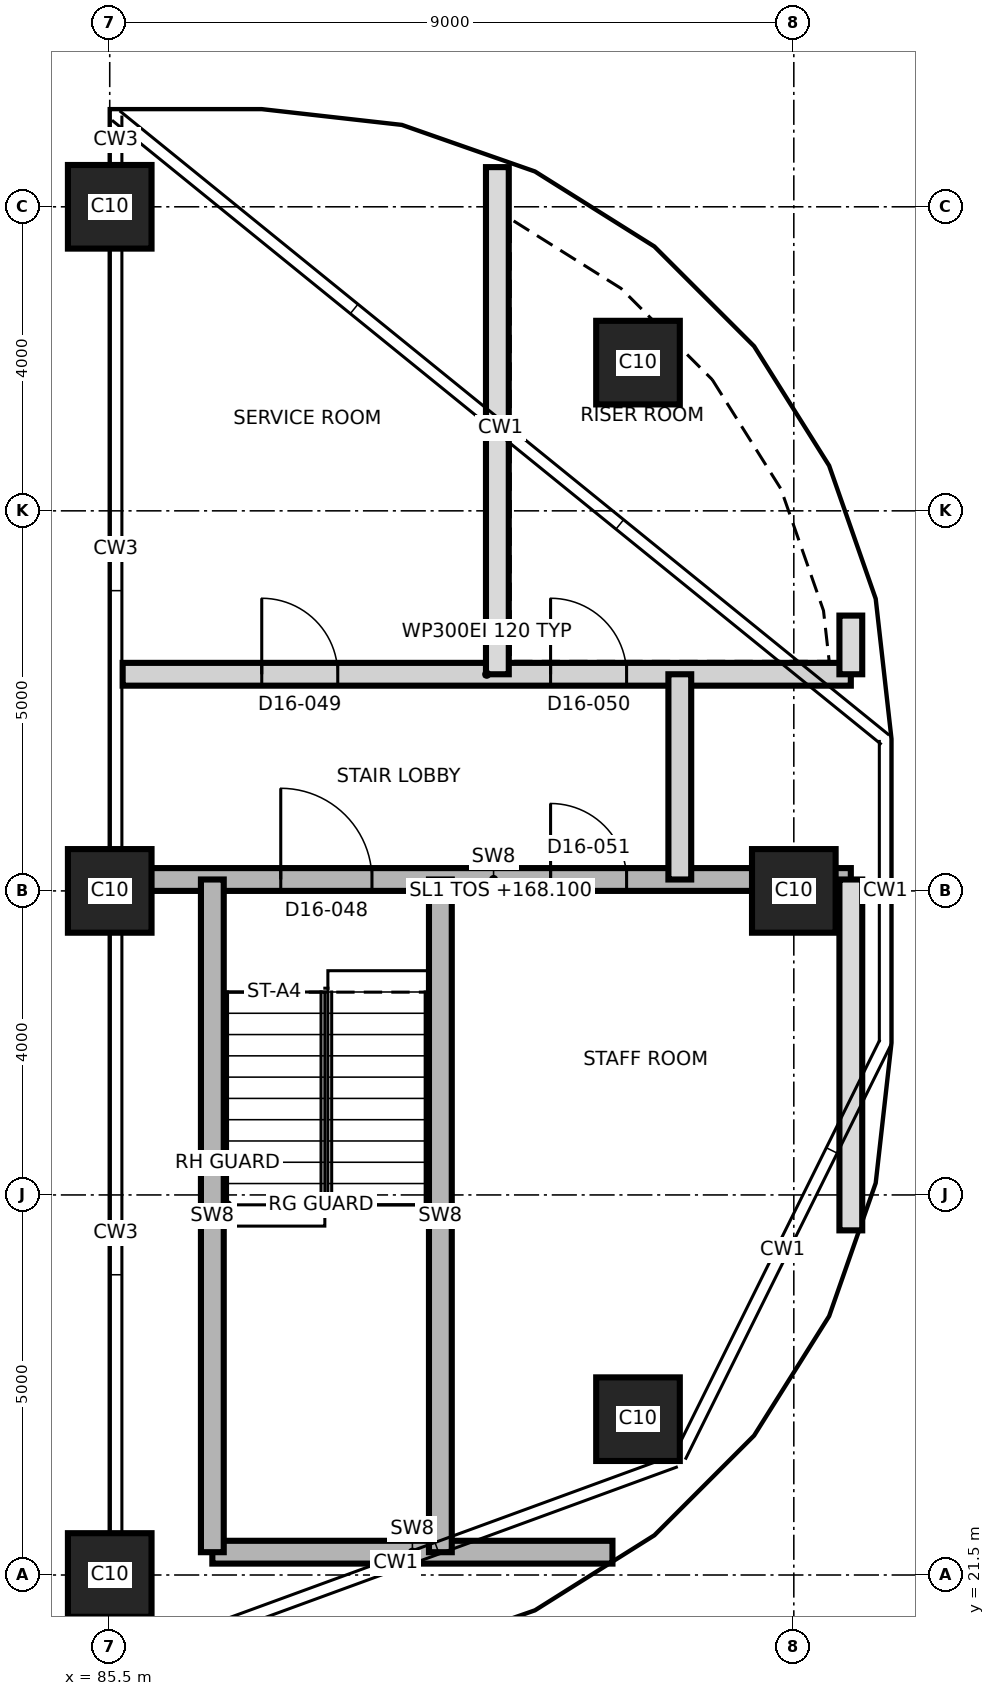
"""IFC4 building model, lengths in metres.
Left out: names, types, materials, properties, quantities, classifications, styles, units other than length and angle.
Written with IfcOpenShell. Run it as: python <this file> out.ifc"""

import sys

from ifc_helpers import new_model, si_unit, direction, frame, frame_2d, origin, origin_2d, place, context, subcontext, project, spatial, rectangle, extrude, element, fill, save


model = new_model("IFC4")
c1 = context("Model", 3, precision=1e-05, world=origin(), true_north=direction((0.0, 1.0)))
c2 = subcontext(c1, "Body", "Model", "MODEL_VIEW")
j1 = project(units=[si_unit("LENGTHUNIT", "METRE"), si_unit("PLANEANGLEUNIT", "RADIAN")], contexts=[c1])
p1 = place(None, origin())
s1 = spatial("IfcSite", under=j1, at=p1, CompositionType="ELEMENT")
p2 = place(p1, origin())
s2 = spatial("IfcBuilding", under=s1, at=p2, CompositionType="ELEMENT")
p3 = place(p2, frame((0.0, 0.0, 168.1)))
s3 = spatial("IfcBuildingStorey", under=s2, at=p3, CompositionType="ELEMENT", Elevation=168.1)
for number, where, z_axis, x_axis in (
    (1, (85.5, 21.5, 0.0), (0.0, 0.0, 1.0), (1.0, 0.0, 0.0)),
    (2, (92.45, 23.55, 0.0), (0.0, 0.0, 1.0), (1.0, 0.0, 0.0)),
    (3, (85.5, 30.5, 0.0), (0.0, 0.0, 1.0), (1.0, 0.0, 0.0)),
    (4, (94.5, 30.5, 0.0), (0.0, 0.0, 1.0), (1.0, 0.0, 0.0)),
    (5, (92.45, 37.45, 0.0), (0.0, 0.0, 1.0), (1.0, 0.0, 0.0)),
    (6, (85.5, 39.5, 0.0), (0.0, 0.0, 1.0), (1.0, 0.0, 0.0)),
):
    element("IfcColumn", number, at=place(p3, frame(where, z_axis=z_axis, x_axis=x_axis)), inside=s3, PredefinedType="COLUMN", context=c2, shape_type="SweptSolid", body=[
        extrude(rectangle(XDim=1.1, YDim=1.1, at=origin_2d()), origin(), (0.0, 0.0, 1.0), 3.7),
    ])
p4 = place(p3, frame((86.85, 21.8, 0.0), z_axis=(0.0, 0.0, 1.0), x_axis=(1.0, 0.0, 0.0)))
e7 = element("IfcWall", 7, at=p4, inside=s3, PredefinedType="SHEAR", context=c2, shape_type="SweptSolid", body=[
    extrude(rectangle(XDim=5.264, YDim=0.3, at=frame_2d((2.632, 0.0))), origin(), (0.0, 0.0, 1.0), 3.4),
])
p5 = place(p3, frame((85.85, 30.65, 0.0), z_axis=(0.0, 0.0, 1.0), x_axis=(1.0, 0.0, 0.0)))
e8 = element("IfcWall", 8, at=p5, inside=s3, PredefinedType="SHEAR", context=c2, shape_type="SweptSolid", body=[
    extrude(rectangle(XDim=9.4, YDim=0.3, at=frame_2d((4.7, 0.0))), origin(), (0.0, 0.0, 1.0), 3.4),
])
p6 = place(p5, frame((1.9, 0.0, 0.0)))
e9 = element("IfcOpeningElement", 9, at=p6, cuts=e8, PredefinedType="OPENING", context=c2, shape_type="SweptSolid", body=[
    extrude(rectangle(XDim=1.2, YDim=2.1, at=frame_2d((0.6, 1.05))), frame((0.0, 0.16, 0.0), z_axis=(0.0, -1.0, 0.0), x_axis=(1.0, 0.0, 0.0)), (0.0, 0.0, 1.0), 0.32),
])
p7 = place(p5, frame((5.45, 0.0, 0.0)))
e10 = element("IfcOpeningElement", 10, at=p7, cuts=e8, PredefinedType="OPENING", context=c2, shape_type="SweptSolid", body=[
    extrude(rectangle(XDim=1.0, YDim=2.1, at=frame_2d((0.5, 1.05))), frame((0.0, 0.16, 0.0), z_axis=(0.0, -1.0, 0.0), x_axis=(1.0, 0.0, 0.0)), (0.0, 0.0, 1.0), 0.32),
])
p8 = place(p3, frame((85.67, 33.35, 0.0), z_axis=(0.0, 0.0, 1.0), x_axis=(1.0, 0.0, 0.0)))
e11 = element("IfcWall", 11, at=p8, inside=s3, PredefinedType="PARTITIONING", context=c2, shape_type="SweptSolid", body=[
    extrude(rectangle(XDim=9.58, YDim=0.3, at=frame_2d((4.79, 0.0))), origin(), (0.0, 0.0, 1.0), 3.4),
])
p9 = place(p8, frame((1.83, 0.0, 0.0)))
e12 = element("IfcOpeningElement", 12, at=p9, cuts=e11, PredefinedType="OPENING", context=c2, shape_type="SweptSolid", body=[
    extrude(rectangle(XDim=1.0, YDim=2.1, at=frame_2d((0.5, 1.05))), frame((0.0, 0.16, 0.0), z_axis=(0.0, -1.0, 0.0), x_axis=(1.0, 0.0, 0.0)), (0.0, 0.0, 1.0), 0.32),
])
p10 = place(p8, frame((5.63, 0.0, 0.0)))
e13 = element("IfcOpeningElement", 13, at=p10, cuts=e11, PredefinedType="OPENING", context=c2, shape_type="SweptSolid", body=[
    extrude(rectangle(XDim=1.0, YDim=2.1, at=frame_2d((0.5, 1.05))), frame((0.0, 0.16, 0.0), z_axis=(0.0, -1.0, 0.0), x_axis=(1.0, 0.0, 0.0)), (0.0, 0.0, 1.0), 0.32),
])
for number, where, z_axis, x_axis in (
    (14, (86.85, 21.8, 0.0), (0.0, 0.0, 1.0), (0.0, 1.0, 0.0)),
    (15, (89.85, 21.8, 0.0), (0.0, 0.0, 1.0), (0.0, 1.0, 0.0)),
):
    element("IfcWall", number, at=place(p3, frame(where, z_axis=z_axis, x_axis=x_axis)), inside=s3, PredefinedType="SHEAR", context=c2, shape_type="SweptSolid", body=[
        extrude(rectangle(XDim=8.85, YDim=0.3, at=frame_2d((4.425, 0.0))), origin(), (0.0, 0.0, 1.0), 3.4),
    ])
p11 = place(p3, frame((90.6, 33.35, 0.0), z_axis=(0.0, 0.0, 1.0), x_axis=(0.0, 1.0, 0.0)))
e16 = element("IfcWall", 16, at=p11, inside=s3, PredefinedType="PARTITIONING", context=c2, shape_type="SweptSolid", body=[
    extrude(rectangle(XDim=6.672, YDim=0.3, at=frame_2d((3.336, 0.0))), origin(), (0.0, 0.0, 1.0), 3.4),
])
p12 = place(p3, frame((93.0, 30.65, 0.0), z_axis=(0.0, 0.0, 1.0), x_axis=(0.0, 1.0, 0.0)))
e17 = element("IfcWall", 17, at=p12, inside=s3, PredefinedType="PARTITIONING", context=c2, shape_type="SweptSolid", body=[
    extrude(rectangle(XDim=2.7, YDim=0.3, at=frame_2d((1.35, 0.0))), origin(), (0.0, 0.0, 1.0), 3.4),
])
p13 = place(p3, frame((95.25, 26.034, 0.0), z_axis=(0.0, 0.0, 1.0), x_axis=(0.0, 1.0, 0.0)))
e18 = element("IfcWall", 18, at=p13, inside=s3, PredefinedType="PARTITIONING", context=c2, shape_type="SweptSolid", body=[
    extrude(rectangle(XDim=4.616, YDim=0.3, at=frame_2d((2.308, 0.0))), origin(), (0.0, 0.0, 1.0), 3.4),
])
p14 = place(p3, frame((95.25, 33.35, 0.0), z_axis=(0.0, 0.0, 1.0), x_axis=(0.0, 1.0, 0.0)))
e19 = element("IfcWall", 19, at=p14, inside=s3, PredefinedType="PARTITIONING", context=c2, shape_type="SweptSolid", body=[
    extrude(rectangle(XDim=0.772, YDim=0.3, at=frame_2d((0.386, 0.0))), origin(), (0.0, 0.0, 1.0), 3.4),
])
p15 = place(p6, origin())
e20 = element("IfcDoor", 20, at=p15, inside=s3, OperationType="SINGLE_SWING_LEFT", PredefinedType="DOOR", context=c2, shape_type="SweptSolid", body=[
    extrude(rectangle(XDim=1.2, YDim=2.1, at=frame_2d((0.6, 1.05))), frame((0.0, 0.025, 0.0), z_axis=(0.0, -1.0, 0.0), x_axis=(1.0, 0.0, 0.0)), (0.0, 0.0, 1.0), 0.05),
])
fill(e9, e20)
p16 = place(p9, origin())
e21 = element("IfcDoor", 21, at=p16, inside=s3, OperationType="SINGLE_SWING_LEFT", PredefinedType="DOOR", context=c2, shape_type="SweptSolid", body=[
    extrude(rectangle(XDim=1.0, YDim=2.1, at=frame_2d((0.5, 1.05))), frame((0.0, 0.025, 0.0), z_axis=(0.0, -1.0, 0.0), x_axis=(1.0, 0.0, 0.0)), (0.0, 0.0, 1.0), 0.05),
])
fill(e12, e21)
p17 = place(p10, origin())
e22 = element("IfcDoor", 22, at=p17, inside=s3, OperationType="SINGLE_SWING_RIGHT", PredefinedType="DOOR", context=c2, shape_type="SweptSolid", body=[
    extrude(rectangle(XDim=1.0, YDim=2.1, at=frame_2d((0.5, 1.05))), frame((0.0, 0.025, 0.0), z_axis=(0.0, -1.0, 0.0), x_axis=(1.0, 0.0, 0.0)), (0.0, 0.0, 1.0), 0.05),
])
fill(e13, e22)
p18 = place(p7, origin())
e23 = element("IfcDoor", 23, at=p18, inside=s3, OperationType="SINGLE_SWING_LEFT", PredefinedType="DOOR", context=c2, shape_type="SweptSolid", body=[
    extrude(rectangle(XDim=1.0, YDim=2.1, at=frame_2d((0.5, 1.05))), frame((0.0, 0.025, 0.0), z_axis=(0.0, -1.0, 0.0), x_axis=(1.0, 0.0, 0.0)), (0.0, 0.0, 1.0), 0.05),
])
fill(e10, e23)
save(model, sys.argv[1])
